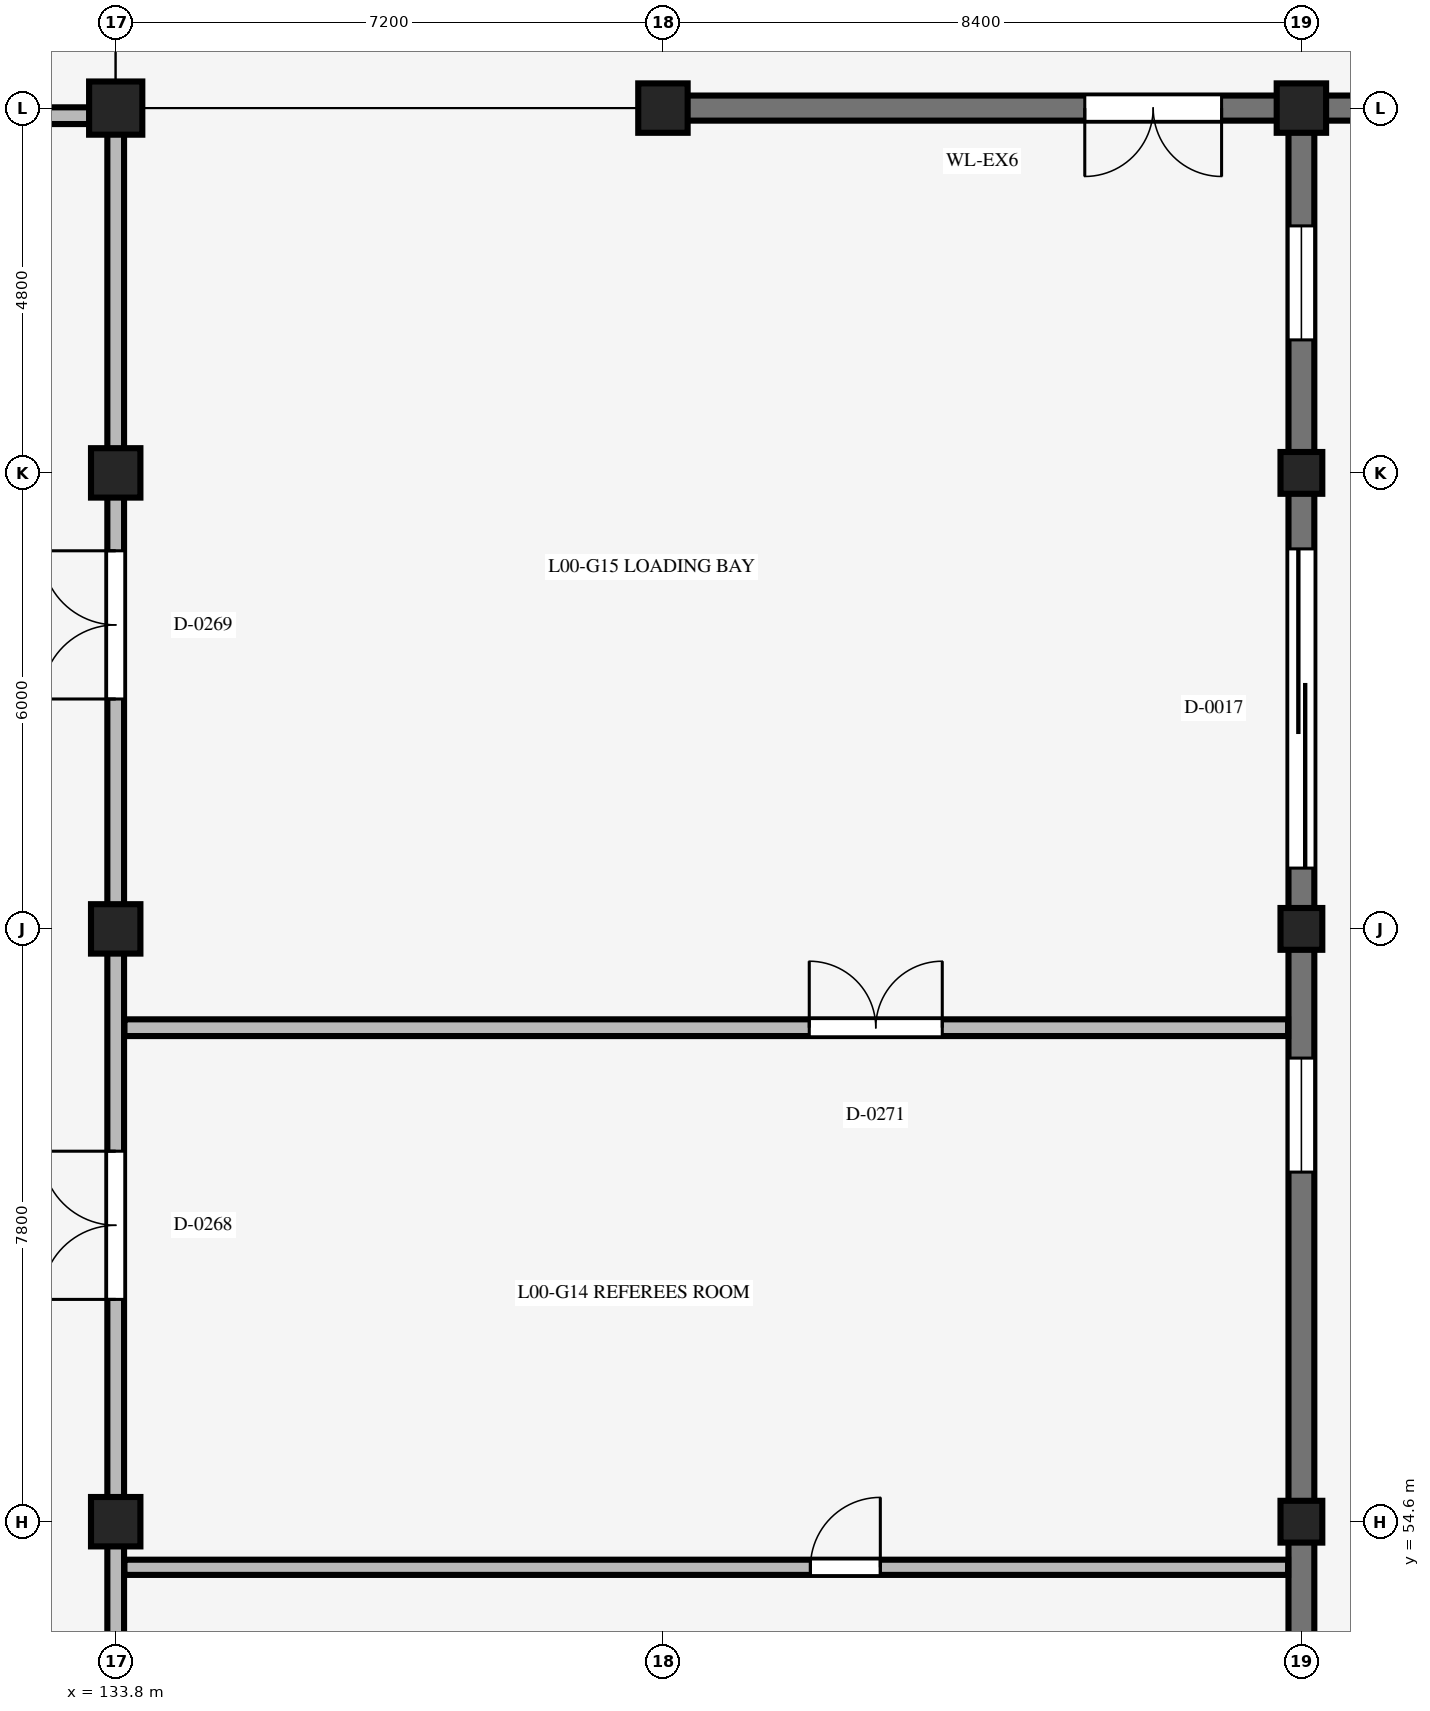
"""IFC4 building model, lengths in metres.
Left out: names, types, materials, properties, quantities, classifications, styles, units other than length and angle.
Written with IfcOpenShell. Run it as: python <this file> out.ifc"""

import sys

from ifc_helpers import new_model, si_unit, direction, frame, frame_2d, origin, origin_2d, place, context, subcontext, project, spatial, rectangle, extrude, element, fill, save


model = new_model("IFC4")
c1 = context("Model", 3, precision=1e-05, world=origin(), true_north=direction((0.0, 1.0)))
c2 = subcontext(c1, "Body", "Model", "MODEL_VIEW")
j1 = project(units=[si_unit("LENGTHUNIT", "METRE"), si_unit("PLANEANGLEUNIT", "RADIAN")], contexts=[c1])
p1 = place(None, origin())
s1 = spatial("IfcSite", under=j1, at=p1, CompositionType="ELEMENT")
p2 = place(p1, origin())
s2 = spatial("IfcBuilding", under=s1, at=p2, CompositionType="ELEMENT")
p3 = place(p2, origin())
s3 = spatial("IfcBuildingStorey", under=s2, at=p3, CompositionType="ELEMENT", Elevation=0.0)
for number, where, z_axis, x_axis in (
    (1, (133.8, 54.6, 0.0), (0.0, 0.0, 1.0), (1.0, 0.0, 0.0)),
    (2, (133.8, 62.4, 0.0), (0.0, 0.0, 1.0), (1.0, 0.0, 0.0)),
    (3, (133.8, 68.4, 0.0), (0.0, 0.0, 1.0), (1.0, 0.0, 0.0)),
):
    element("IfcColumn", number, at=place(p3, frame(where, z_axis=z_axis, x_axis=x_axis)), inside=s3, PredefinedType="COLUMN", context=c2, shape_type="SweptSolid", body=[
        extrude(rectangle(XDim=0.65, YDim=0.65, at=origin_2d()), origin(), (0.0, 0.0, 1.0), 6.0),
    ])
p4 = place(p3, frame((133.8, 73.2, 0.0), z_axis=(0.0, 0.0, 1.0), x_axis=(1.0, 0.0, 0.0)))
e4 = element("IfcColumn", 4, at=p4, inside=s3, PredefinedType="COLUMN", context=c2, shape_type="SweptSolid", body=[
    extrude(rectangle(XDim=0.7, YDim=0.7, at=origin_2d()), origin(), (0.0, 0.0, 1.0), 6.0),
])
for number, where, z_axis, x_axis in (
    (5, (141.0, 73.2, 0.0), (0.0, 0.0, 1.0), (1.0, 0.0, 0.0)),
    (6, (149.4, 73.2, 0.0), (0.0, 0.0, 1.0), (1.0, 0.0, 0.0)),
):
    element("IfcColumn", number, at=place(p3, frame(where, z_axis=z_axis, x_axis=x_axis)), inside=s3, PredefinedType="COLUMN", context=c2, shape_type="SweptSolid", body=[
        extrude(rectangle(XDim=0.65, YDim=0.65, at=origin_2d()), origin(), (0.0, 0.0, 1.0), 6.0),
    ])
for number, where, z_axis, x_axis in (
    (7, (149.4, 54.6, 0.0), (0.0, 0.0, 1.0), (1.0, 0.0, 0.0)),
    (8, (149.4, 62.4, 0.0), (0.0, 0.0, 1.0), (1.0, 0.0, 0.0)),
    (9, (149.4, 68.4, 0.0), (0.0, 0.0, 1.0), (1.0, 0.0, 0.0)),
):
    element("IfcColumn", number, at=place(p3, frame(where, z_axis=z_axis, x_axis=x_axis)), inside=s3, PredefinedType="COLUMN", context=c2, shape_type="SweptSolid", body=[
        extrude(rectangle(XDim=0.55, YDim=0.55, at=origin_2d()), origin(), (0.0, 0.0, 1.0), 6.0),
    ])
p5 = place(p3, frame((149.4, 54.335, 0.0), z_axis=(0.0, 0.0, 1.0), x_axis=(0.0, -1.0, 0.0)))
e10 = element("IfcWall", 10, at=p5, inside=s3, PredefinedType="STANDARD", context=c2, shape_type="SweptSolid", body=[
    extrude(rectangle(XDim=7.27, YDim=0.34, at=frame_2d((3.635, 0.0))), origin(), (0.0, 0.0, 1.0), 5.76),
])
p6 = place(p5, frame((2.685, 0.0, 0.0)))
e11 = element("IfcOpeningElement", 11, at=p6, cuts=e10, PredefinedType="OPENING", context=c2, shape_type="SweptSolid", body=[
    extrude(rectangle(XDim=1.8, YDim=2.25, at=frame_2d((0.9, 1.125))), frame((0.0, 0.18, 0.0), z_axis=(0.0, -1.0, 0.0), x_axis=(1.0, 0.0, 0.0)), (0.0, 0.0, 1.0), 0.36),
])
p7 = place(p3, frame((149.4, 62.135, 0.0), z_axis=(0.0, 0.0, 1.0), x_axis=(0.0, -1.0, 0.0)))
e12 = element("IfcWall", 12, at=p7, inside=s3, PredefinedType="STANDARD", context=c2, shape_type="SweptSolid", body=[
    extrude(rectangle(XDim=7.27, YDim=0.34, at=frame_2d((3.635, 0.0))), origin(), (0.0, 0.0, 1.0), 5.76),
])
p8 = place(p7, frame((1.435, 0.0, 1.2)))
e13 = element("IfcOpeningElement", 13, at=p8, cuts=e12, PredefinedType="OPENING", context=c2, shape_type="SweptSolid", body=[
    extrude(rectangle(XDim=1.5, YDim=1.6, at=frame_2d((0.75, 0.8))), frame((0.0, 0.18, 0.0), z_axis=(0.0, -1.0, 0.0), x_axis=(1.0, 0.0, 0.0)), (0.0, 0.0, 1.0), 0.36),
])
p9 = place(p3, frame((149.4, 68.135, 0.0), z_axis=(0.0, 0.0, 1.0), x_axis=(0.0, -1.0, 0.0)))
e14 = element("IfcWall", 14, at=p9, inside=s3, PredefinedType="STANDARD", context=c2, shape_type="SweptSolid", body=[
    extrude(rectangle(XDim=5.47, YDim=0.34, at=frame_2d((2.735, 0.0))), origin(), (0.0, 0.0, 1.0), 5.76),
])
p10 = place(p9, frame((0.735, 0.0, 0.0)))
e15 = element("IfcOpeningElement", 15, at=p10, cuts=e14, PredefinedType="OPENING", context=c2, shape_type="SweptSolid", body=[
    extrude(rectangle(XDim=4.2, YDim=4.2, at=frame_2d((2.1, 2.1))), frame((0.0, 0.18, 0.0), z_axis=(0.0, -1.0, 0.0), x_axis=(1.0, 0.0, 0.0)), (0.0, 0.0, 1.0), 0.36),
])
p11 = place(p3, frame((149.4, 72.885, 0.0), z_axis=(0.0, 0.0, 1.0), x_axis=(0.0, -1.0, 0.0)))
e16 = element("IfcWall", 16, at=p11, inside=s3, PredefinedType="STANDARD", context=c2, shape_type="SweptSolid", body=[
    extrude(rectangle(XDim=4.22, YDim=0.34, at=frame_2d((2.11, 0.0))), origin(), (0.0, 0.0, 1.0), 5.76),
])
p12 = place(p11, frame((1.235, 0.0, 1.2)))
e17 = element("IfcOpeningElement", 17, at=p12, cuts=e16, PredefinedType="OPENING", context=c2, shape_type="SweptSolid", body=[
    extrude(rectangle(XDim=1.5, YDim=1.6, at=frame_2d((0.75, 0.8))), frame((0.0, 0.18, 0.0), z_axis=(0.0, -1.0, 0.0), x_axis=(1.0, 0.0, 0.0)), (0.0, 0.0, 1.0), 0.36),
])
p13 = place(p3, frame((149.085, 73.2, 0.0), z_axis=(0.0, 0.0, 1.0), x_axis=(-1.0, 0.0, 0.0)))
e18 = element("IfcWall", 18, at=p13, inside=s3, PredefinedType="STANDARD", context=c2, shape_type="SweptSolid", body=[
    extrude(rectangle(XDim=7.77, YDim=0.33, at=frame_2d((3.885, 0.0))), origin(), (0.0, 0.0, 1.0), 5.76),
])
p14 = place(p13, frame((0.735, 0.0, 0.0)))
e19 = element("IfcOpeningElement", 19, at=p14, cuts=e18, PredefinedType="OPENING", context=c2, shape_type="SweptSolid", body=[
    extrude(rectangle(XDim=1.8, YDim=2.25, at=frame_2d((0.9, 1.125))), frame((0.0, 0.175, 0.0), z_axis=(0.0, -1.0, 0.0), x_axis=(1.0, 0.0, 0.0)), (0.0, 0.0, 1.0), 0.35),
])
p15 = place(p3, frame((157.485, 73.2, 0.0), z_axis=(0.0, 0.0, 1.0), x_axis=(-1.0, 0.0, 0.0)))
e20 = element("IfcWall", 20, at=p15, inside=s3, PredefinedType="STANDARD", context=c2, shape_type="SweptSolid", body=[
    extrude(rectangle(XDim=7.77, YDim=0.33, at=frame_2d((3.885, 0.0))), origin(), (0.0, 0.0, 1.0), 5.76),
])
p16 = place(p15, frame((2.235, 0.0, 1.1)))
e21 = element("IfcOpeningElement", 21, at=p16, cuts=e20, PredefinedType="OPENING", context=c2, shape_type="SweptSolid", body=[
    extrude(rectangle(XDim=2.8, YDim=2.2, at=frame_2d((1.4, 1.1))), frame((0.0, 0.175, 0.0), z_axis=(0.0, -1.0, 0.0), x_axis=(1.0, 0.0, 0.0)), (0.0, 0.0, 1.0), 0.35),
])
p17 = place(p3, frame((125.1, 73.1, 0.0), z_axis=(0.0, 0.0, 1.0), x_axis=(1.0, 0.0, 0.0)))
e22 = element("IfcWall", 22, at=p17, inside=s3, PredefinedType="STANDARD", context=c2, shape_type="SweptSolid", body=[
    extrude(rectangle(XDim=8.4, YDim=0.22, at=frame_2d((4.2, 0.0))), origin(), (0.0, 0.0, 1.0), 3.05),
])
p18 = place(p17, frame((3.325, 0.0, 0.0)))
e23 = element("IfcOpeningElement", 23, at=p18, cuts=e22, PredefinedType="OPENING", context=c2, shape_type="SweptSolid", body=[
    extrude(rectangle(XDim=1.75, YDim=2.4, at=frame_2d((0.875, 1.2))), frame((0.0, 0.12, 0.0), z_axis=(0.0, -1.0, 0.0), x_axis=(1.0, 0.0, 0.0)), (0.0, 0.0, 1.0), 0.24),
])
p19 = place(p3, frame((133.8, 47.1, 0.0), z_axis=(0.0, 0.0, 1.0), x_axis=(0.0, 1.0, 0.0)))
e24 = element("IfcWall", 24, at=p19, inside=s3, PredefinedType="STANDARD", context=c2, shape_type="SweptSolid", body=[
    extrude(rectangle(XDim=7.2, YDim=0.22, at=frame_2d((3.6, 0.0))), origin(), (0.0, 0.0, 1.0), 3.05),
])
p20 = place(p19, frame((2.625, 0.0, 0.0)))
e25 = element("IfcOpeningElement", 25, at=p20, cuts=e24, PredefinedType="OPENING", context=c2, shape_type="SweptSolid", body=[
    extrude(rectangle(XDim=1.95, YDim=2.35, at=frame_2d((0.975, 1.175))), frame((0.0, 0.12, 0.0), z_axis=(0.0, -1.0, 0.0), x_axis=(1.0, 0.0, 0.0)), (0.0, 0.0, 1.0), 0.24),
])
p21 = place(p3, frame((133.8, 54.9, 0.0), z_axis=(0.0, 0.0, 1.0), x_axis=(0.0, 1.0, 0.0)))
e26 = element("IfcWall", 26, at=p21, inside=s3, PredefinedType="STANDARD", context=c2, shape_type="SweptSolid", body=[
    extrude(rectangle(XDim=7.2, YDim=0.22, at=frame_2d((3.6, 0.0))), origin(), (0.0, 0.0, 1.0), 3.05),
])
p22 = place(p21, frame((2.625, 0.0, 0.0)))
e27 = element("IfcOpeningElement", 27, at=p22, cuts=e26, PredefinedType="OPENING", context=c2, shape_type="SweptSolid", body=[
    extrude(rectangle(XDim=1.95, YDim=2.35, at=frame_2d((0.975, 1.175))), frame((0.0, 0.12, 0.0), z_axis=(0.0, -1.0, 0.0), x_axis=(1.0, 0.0, 0.0)), (0.0, 0.0, 1.0), 0.24),
])
p23 = place(p3, frame((133.8, 62.7, 0.0), z_axis=(0.0, 0.0, 1.0), x_axis=(0.0, 1.0, 0.0)))
e28 = element("IfcWall", 28, at=p23, inside=s3, PredefinedType="STANDARD", context=c2, shape_type="SweptSolid", body=[
    extrude(rectangle(XDim=10.2, YDim=0.22, at=frame_2d((5.1, 0.0))), origin(), (0.0, 0.0, 1.0), 3.05),
])
p24 = place(p23, frame((2.725, 0.0, 0.0)))
e29 = element("IfcOpeningElement", 29, at=p24, cuts=e28, PredefinedType="OPENING", context=c2, shape_type="SweptSolid", body=[
    extrude(rectangle(XDim=1.95, YDim=2.35, at=frame_2d((0.975, 1.175))), frame((0.0, 0.12, 0.0), z_axis=(0.0, -1.0, 0.0), x_axis=(1.0, 0.0, 0.0)), (0.0, 0.0, 1.0), 0.24),
])
p25 = place(p3, frame((133.915, 54.0, 0.0), z_axis=(0.0, 0.0, 1.0), x_axis=(1.0, 0.0, 0.0)))
e30 = element("IfcWall", 30, at=p25, inside=s3, PredefinedType="STANDARD", context=c2, shape_type="SweptSolid", body=[
    extrude(rectangle(XDim=15.31, YDim=0.2, at=frame_2d((7.655, 0.0))), origin(), (0.0, 0.0, 1.0), 3.05),
])
p26 = place(p25, frame((9.025, 0.0, 0.0)))
e31 = element("IfcOpeningElement", 31, at=p26, cuts=e30, PredefinedType="OPENING", context=c2, shape_type="SweptSolid", body=[
    extrude(rectangle(XDim=0.92, YDim=2.15, at=frame_2d((0.46, 1.075))), frame((0.0, 0.11, 0.0), z_axis=(0.0, -1.0, 0.0), x_axis=(1.0, 0.0, 0.0)), (0.0, 0.0, 1.0), 0.22),
])
p27 = place(p3, frame((133.915, 61.1, 0.0), z_axis=(0.0, 0.0, 1.0), x_axis=(1.0, 0.0, 0.0)))
e32 = element("IfcWall", 32, at=p27, inside=s3, PredefinedType="STANDARD", context=c2, shape_type="SweptSolid", body=[
    extrude(rectangle(XDim=15.31, YDim=0.22, at=frame_2d((7.655, 0.0))), origin(), (0.0, 0.0, 1.0), 3.05),
])
p28 = place(p27, frame((9.01, 0.0, 0.0)))
e33 = element("IfcOpeningElement", 33, at=p28, cuts=e32, PredefinedType="OPENING", context=c2, shape_type="SweptSolid", body=[
    extrude(rectangle(XDim=1.75, YDim=2.4, at=frame_2d((0.875, 1.2))), frame((0.0, 0.12, 0.0), z_axis=(0.0, -1.0, 0.0), x_axis=(1.0, 0.0, 0.0)), (0.0, 0.0, 1.0), 0.24),
])
p29 = place(p8, origin())
e34 = element("IfcWindow", 34, at=p29, inside=s3, PartitioningType="SINGLE_PANEL", PredefinedType="WINDOW", context=c2, shape_type="SweptSolid", body=[
    extrude(rectangle(XDim=1.5, YDim=1.6, at=frame_2d((0.75, 0.8))), frame((0.0, 0.03, 0.0), z_axis=(0.0, -1.0, 0.0), x_axis=(1.0, 0.0, 0.0)), (0.0, 0.0, 1.0), 0.06),
])
fill(e13, e34)
p30 = place(p10, origin())
e35 = element("IfcDoor", 35, at=p30, inside=s3, OperationType="ROLLINGUP", PredefinedType="GATE", context=c2, shape_type="SweptSolid", body=[
    extrude(rectangle(XDim=4.2, YDim=4.2, at=frame_2d((2.1, 2.1))), frame((0.0, 0.025, 0.0), z_axis=(0.0, -1.0, 0.0), x_axis=(1.0, 0.0, 0.0)), (0.0, 0.0, 1.0), 0.05),
])
fill(e15, e35)
p31 = place(p12, origin())
e36 = element("IfcWindow", 36, at=p31, inside=s3, PartitioningType="SINGLE_PANEL", PredefinedType="WINDOW", context=c2, shape_type="SweptSolid", body=[
    extrude(rectangle(XDim=1.5, YDim=1.6, at=frame_2d((0.75, 0.8))), frame((0.0, 0.03, 0.0), z_axis=(0.0, -1.0, 0.0), x_axis=(1.0, 0.0, 0.0)), (0.0, 0.0, 1.0), 0.06),
])
fill(e17, e36)
p32 = place(p14, origin())
e37 = element("IfcDoor", 37, at=p32, inside=s3, OperationType="DOUBLE_DOOR_SINGLE_SWING", PredefinedType="DOOR", context=c2, shape_type="SweptSolid", body=[
    extrude(rectangle(XDim=1.8, YDim=2.25, at=frame_2d((0.9, 1.125))), frame((0.0, 0.025, 0.0), z_axis=(0.0, -1.0, 0.0), x_axis=(1.0, 0.0, 0.0)), (0.0, 0.0, 1.0), 0.05),
])
fill(e19, e37)
p33 = place(p22, origin())
e38 = element("IfcDoor", 38, at=p33, inside=s3, OperationType="DOUBLE_DOOR_SINGLE_SWING", PredefinedType="DOOR", context=c2, shape_type="SweptSolid", body=[
    extrude(rectangle(XDim=1.95, YDim=2.35, at=frame_2d((0.975, 1.175))), frame((0.0, 0.025, 0.0), z_axis=(0.0, -1.0, 0.0), x_axis=(1.0, 0.0, 0.0)), (0.0, 0.0, 1.0), 0.05),
])
fill(e27, e38)
p34 = place(p24, origin())
e39 = element("IfcDoor", 39, at=p34, inside=s3, OperationType="DOUBLE_DOOR_SINGLE_SWING", PredefinedType="DOOR", context=c2, shape_type="SweptSolid", body=[
    extrude(rectangle(XDim=1.95, YDim=2.35, at=frame_2d((0.975, 1.175))), frame((0.0, 0.025, 0.0), z_axis=(0.0, -1.0, 0.0), x_axis=(1.0, 0.0, 0.0)), (0.0, 0.0, 1.0), 0.05),
])
fill(e29, e39)
p35 = place(p26, origin())
e40 = element("IfcDoor", 40, at=p35, inside=s3, OperationType="SINGLE_SWING_RIGHT", PredefinedType="DOOR", context=c2, shape_type="SweptSolid", body=[
    extrude(rectangle(XDim=0.92, YDim=2.15, at=frame_2d((0.46, 1.075))), frame((0.0, 0.025, 0.0), z_axis=(0.0, -1.0, 0.0), x_axis=(1.0, 0.0, 0.0)), (0.0, 0.0, 1.0), 0.05),
])
fill(e31, e40)
p36 = place(p28, origin())
e41 = element("IfcDoor", 41, at=p36, inside=s3, OperationType="DOUBLE_DOOR_SINGLE_SWING", PredefinedType="DOOR", context=c2, shape_type="SweptSolid", body=[
    extrude(rectangle(XDim=1.75, YDim=2.4, at=frame_2d((0.875, 1.2))), frame((0.0, 0.025, 0.0), z_axis=(0.0, -1.0, 0.0), x_axis=(1.0, 0.0, 0.0)), (0.0, 0.0, 1.0), 0.05),
])
fill(e33, e41)
save(model, sys.argv[1])
